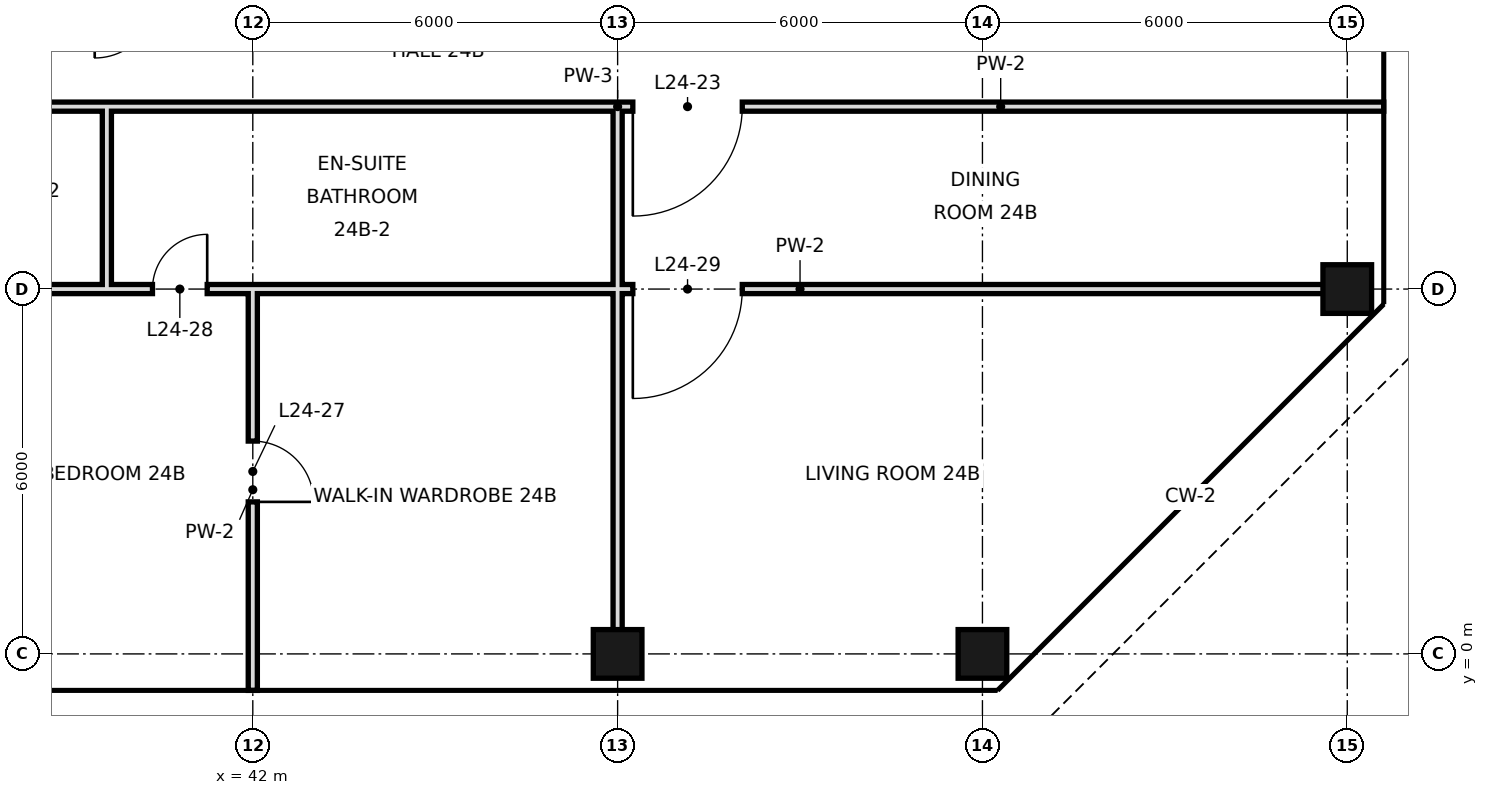
"""IFC4 building model, lengths in metres.
Left out: names, types, materials, properties, quantities, classifications, styles, units other than length and angle.
Written with IfcOpenShell. Run it as: python <this file> out.ifc"""

import sys

from ifc_helpers import new_model, si_unit, direction, frame, frame_2d, origin, origin_2d, place, context, subcontext, project, spatial, rectangle, hollow_rectangle, extrude, element, fill, save


model = new_model("IFC4")
c1 = context("Model", 3, precision=1e-05, world=origin(), true_north=direction((0.0, 1.0)))
c2 = subcontext(c1, "Body", "Model", "MODEL_VIEW")
j1 = project(units=[si_unit("LENGTHUNIT", "METRE"), si_unit("PLANEANGLEUNIT", "RADIAN")], contexts=[c1])
p1 = place(None, origin())
s1 = spatial("IfcSite", under=j1, at=p1, CompositionType="ELEMENT")
p2 = place(p1, origin())
s2 = spatial("IfcBuilding", under=s1, at=p2, CompositionType="ELEMENT")
p3 = place(p2, frame((0.0, 0.0, 110.6)))
s3 = spatial("IfcBuildingStorey", under=s2, at=p3, CompositionType="ELEMENT", Elevation=110.6)
for number, where, z_axis, x_axis in (
    (1, (48.0, 0.0, 0.0), (0.0, 0.0, 1.0), (1.0, 0.0, 0.0)),
    (2, (54.0, 0.0, 0.0), (0.0, 0.0, 1.0), (1.0, 0.0, 0.0)),
    (3, (60.0, 6.0, 0.0), (0.0, 0.0, 1.0), (1.0, 0.0, 0.0)),
):
    element("IfcColumn", number, at=place(p3, frame(where, z_axis=z_axis, x_axis=x_axis)), inside=s3, PredefinedType="COLUMN", context=c2, shape_type="SweptSolid", body=[
        extrude(hollow_rectangle(XDim=0.8, YDim=0.8, WallThickness=0.04, at=origin_2d()), origin(), (0.0, 0.0, 1.0), 3.6),
    ])
p4 = place(p3, frame((39.6, 6.0, 0.0), z_axis=(0.0, 0.0, 1.0), x_axis=(0.0, 1.0, 0.0)))
e4 = element("IfcWall", 4, at=p4, inside=s3, PredefinedType="PARTITIONING", context=c2, shape_type="SweptSolid", body=[
    extrude(rectangle(XDim=3.0, YDim=0.15, at=frame_2d((1.5, 0.0))), origin(), (0.0, 0.0, 1.0), 3.38),
])
p5 = place(p3, frame((42.0, -0.6, 0.0), z_axis=(0.0, 0.0, 1.0), x_axis=(0.0, 1.0, 0.0)))
e5 = element("IfcWall", 5, at=p5, inside=s3, PredefinedType="PARTITIONING", context=c2, shape_type="SweptSolid", body=[
    extrude(rectangle(XDim=6.6, YDim=0.15, at=frame_2d((3.3, 0.0))), origin(), (0.0, 0.0, 1.0), 2.68),
])
p6 = place(p5, frame((3.1, 0.0, 0.0)))
e6 = element("IfcOpeningElement", 6, at=p6, cuts=e5, PredefinedType="OPENING", context=c2, shape_type="SweptSolid", body=[
    extrude(rectangle(XDim=1.0, YDim=2.4, at=frame_2d((0.5, 1.2))), frame((0.0, 0.085, 0.0), z_axis=(0.0, -1.0, 0.0), x_axis=(1.0, 0.0, 0.0)), (0.0, 0.0, 1.0), 0.17),
])
p7 = place(p3, frame((48.0, 0.0, 0.0), z_axis=(0.0, 0.0, 1.0), x_axis=(0.0, 1.0, 0.0)))
e7 = element("IfcWall", 7, at=p7, inside=s3, PredefinedType="PARTITIONING", context=c2, shape_type="SweptSolid", body=[
    extrude(rectangle(XDim=6.0, YDim=0.15, at=frame_2d((3.0, 0.0))), origin(), (0.0, 0.0, 1.0), 2.68),
])
p8 = place(p3, frame((48.0, 6.0, 0.0), z_axis=(0.0, 0.0, 1.0), x_axis=(0.0, 1.0, 0.0)))
e8 = element("IfcWall", 8, at=p8, inside=s3, PredefinedType="PARTITIONING", context=c2, shape_type="SweptSolid", body=[
    extrude(rectangle(XDim=3.0, YDim=0.15, at=frame_2d((1.5, 0.0))), origin(), (0.0, 0.0, 1.0), 2.68),
])
p9 = place(p3, frame((33.0, 6.0, 0.0), z_axis=(0.0, 0.0, 1.0), x_axis=(1.0, 0.0, 0.0)))
e9 = element("IfcWall", 9, at=p9, inside=s3, PredefinedType="PARTITIONING", context=c2, shape_type="SweptSolid", body=[
    extrude(rectangle(XDim=6.6, YDim=0.15, at=frame_2d((3.3, 0.0))), origin(), (0.0, 0.0, 1.0), 2.93),
])
p10 = place(p9, frame((1.3, 0.0, 0.0)))
e10 = element("IfcOpeningElement", 10, at=p10, cuts=e9, PredefinedType="OPENING", context=c2, shape_type="SweptSolid", body=[
    extrude(rectangle(XDim=1.0, YDim=2.4, at=frame_2d((0.5, 1.2))), frame((0.0, 0.085, 0.0), z_axis=(0.0, -1.0, 0.0), x_axis=(1.0, 0.0, 0.0)), (0.0, 0.0, 1.0), 0.17),
])
p11 = place(p9, frame((4.3, 0.0, 0.0)))
e11 = element("IfcOpeningElement", 11, at=p11, cuts=e9, PredefinedType="OPENING", context=c2, shape_type="SweptSolid", body=[
    extrude(rectangle(XDim=1.0, YDim=2.4, at=frame_2d((0.5, 1.2))), frame((0.0, 0.085, 0.0), z_axis=(0.0, -1.0, 0.0), x_axis=(1.0, 0.0, 0.0)), (0.0, 0.0, 1.0), 0.17),
])
p12 = place(p3, frame((48.0, 6.0, 0.0), z_axis=(0.0, 0.0, 1.0), x_axis=(1.0, 0.0, 0.0)))
e12 = element("IfcWall", 12, at=p12, inside=s3, PredefinedType="PARTITIONING", context=c2, shape_type="SweptSolid", body=[
    extrude(rectangle(XDim=12.0, YDim=0.15, at=frame_2d((6.0, 0.0))), origin(), (0.0, 0.0, 1.0), 2.68),
])
p13 = place(p12, frame((0.25, 0.0, 0.0)))
e13 = element("IfcOpeningElement", 13, at=p13, cuts=e12, PredefinedType="OPENING", context=c2, shape_type="SweptSolid", body=[
    extrude(rectangle(XDim=1.8, YDim=2.4, at=frame_2d((0.9, 1.2))), frame((0.0, 0.085, 0.0), z_axis=(0.0, -1.0, 0.0), x_axis=(1.0, 0.0, 0.0)), (0.0, 0.0, 1.0), 0.17),
])
p14 = place(p3, frame((39.6, 6.0, 0.0), z_axis=(0.0, 0.0, 1.0), x_axis=(1.0, 0.0, 0.0)))
e14 = element("IfcWall", 14, at=p14, inside=s3, PredefinedType="PARTITIONING", context=c2, shape_type="SweptSolid", body=[
    extrude(rectangle(XDim=8.4, YDim=0.15, at=frame_2d((4.2, 0.0))), origin(), (0.0, 0.0, 1.0), 2.93),
])
p15 = place(p14, frame((0.75, 0.0, 0.0)))
e15 = element("IfcOpeningElement", 15, at=p15, cuts=e14, PredefinedType="OPENING", context=c2, shape_type="SweptSolid", body=[
    extrude(rectangle(XDim=0.9, YDim=2.4, at=frame_2d((0.45, 1.2))), frame((0.0, 0.085, 0.0), z_axis=(0.0, -1.0, 0.0), x_axis=(1.0, 0.0, 0.0)), (0.0, 0.0, 1.0), 0.17),
])
p16 = place(p3, frame((33.0, 9.0, 0.0), z_axis=(0.0, 0.0, 1.0), x_axis=(1.0, 0.0, 0.0)))
e16 = element("IfcWall", 16, at=p16, inside=s3, PredefinedType="PARTITIONING", context=c2, shape_type="SweptSolid", body=[
    extrude(rectangle(XDim=6.6, YDim=0.15, at=frame_2d((3.3, 0.0))), origin(), (0.0, 0.0, 1.0), 3.38),
])
p17 = place(p16, frame((0.7, 0.0, 0.0)))
e17 = element("IfcOpeningElement", 17, at=p17, cuts=e16, PredefinedType="OPENING", context=c2, shape_type="SweptSolid", body=[
    extrude(rectangle(XDim=1.0, YDim=2.4, at=frame_2d((0.5, 1.2))), frame((0.0, 0.085, 0.0), z_axis=(0.0, -1.0, 0.0), x_axis=(1.0, 0.0, 0.0)), (0.0, 0.0, 1.0), 0.17),
])
p18 = place(p16, frame((4.3, 0.0, 0.0)))
e18 = element("IfcOpeningElement", 18, at=p18, cuts=e16, PredefinedType="OPENING", context=c2, shape_type="SweptSolid", body=[
    extrude(rectangle(XDim=1.0, YDim=2.4, at=frame_2d((0.5, 1.2))), frame((0.0, 0.085, 0.0), z_axis=(0.0, -1.0, 0.0), x_axis=(1.0, 0.0, 0.0)), (0.0, 0.0, 1.0), 0.17),
])
p19 = place(p3, frame((48.0, 9.0, 0.0), z_axis=(0.0, 0.0, 1.0), x_axis=(1.0, 0.0, 0.0)))
e19 = element("IfcWall", 19, at=p19, inside=s3, PredefinedType="PARTITIONING", context=c2, shape_type="SweptSolid", body=[
    extrude(rectangle(XDim=12.6, YDim=0.15, at=frame_2d((6.3, 0.0))), origin(), (0.0, 0.0, 1.0), 3.38),
])
p20 = place(p19, frame((0.25, 0.0, 0.0)))
e20 = element("IfcOpeningElement", 20, at=p20, cuts=e19, PredefinedType="OPENING", context=c2, shape_type="SweptSolid", body=[
    extrude(rectangle(XDim=1.8, YDim=2.4, at=frame_2d((0.9, 1.2))), frame((0.0, 0.085, 0.0), z_axis=(0.0, -1.0, 0.0), x_axis=(1.0, 0.0, 0.0)), (0.0, 0.0, 1.0), 0.17),
])
p21 = place(p3, frame((39.6, 9.0, 0.0), z_axis=(0.0, 0.0, 1.0), x_axis=(1.0, 0.0, 0.0)))
e21 = element("IfcWall", 21, at=p21, inside=s3, PredefinedType="PARTITIONING", context=c2, shape_type="SweptSolid", body=[
    extrude(rectangle(XDim=8.4, YDim=0.15, at=frame_2d((4.2, 0.0))), origin(), (0.0, 0.0, 1.0), 3.38),
])
p22 = place(p20, frame((1.8, 0.0, 0.0), z_axis=(0.0, 0.0, 1.0), x_axis=(-1.0, 0.0, 0.0)))
e22 = element("IfcDoor", 22, at=p22, inside=s3, OperationType="SINGLE_SWING_RIGHT", PredefinedType="DOOR", context=c2, shape_type="SweptSolid", body=[
    extrude(rectangle(XDim=1.8, YDim=2.4, at=frame_2d((0.9, 1.2))), frame((0.0, 0.025, 0.0), z_axis=(0.0, -1.0, 0.0), x_axis=(1.0, 0.0, 0.0)), (0.0, 0.0, 1.0), 0.05),
])
fill(e20, e22)
p23 = place(p6, frame((1.0, 0.0, 0.0), z_axis=(0.0, 0.0, 1.0), x_axis=(-1.0, 0.0, 0.0)))
e23 = element("IfcDoor", 23, at=p23, inside=s3, OperationType="SINGLE_SWING_RIGHT", PredefinedType="DOOR", context=c2, shape_type="SweptSolid", body=[
    extrude(rectangle(XDim=1.0, YDim=2.4, at=frame_2d((0.5, 1.2))), frame((0.0, 0.025, 0.0), z_axis=(0.0, -1.0, 0.0), x_axis=(1.0, 0.0, 0.0)), (0.0, 0.0, 1.0), 0.05),
])
fill(e6, e23)
p24 = place(p15, frame((0.9, 0.0, 0.0), z_axis=(0.0, 0.0, 1.0), x_axis=(-1.0, 0.0, 0.0)))
e24 = element("IfcDoor", 24, at=p24, inside=s3, OperationType="SINGLE_SWING_LEFT", PredefinedType="DOOR", context=c2, shape_type="SweptSolid", body=[
    extrude(rectangle(XDim=0.9, YDim=2.4, at=frame_2d((0.45, 1.2))), frame((0.0, 0.025, 0.0), z_axis=(0.0, -1.0, 0.0), x_axis=(1.0, 0.0, 0.0)), (0.0, 0.0, 1.0), 0.05),
])
fill(e15, e24)
p25 = place(p13, frame((1.8, 0.0, 0.0), z_axis=(0.0, 0.0, 1.0), x_axis=(-1.0, 0.0, 0.0)))
e25 = element("IfcDoor", 25, at=p25, inside=s3, OperationType="SINGLE_SWING_RIGHT", PredefinedType="DOOR", context=c2, shape_type="SweptSolid", body=[
    extrude(rectangle(XDim=1.8, YDim=2.4, at=frame_2d((0.9, 1.2))), frame((0.0, 0.025, 0.0), z_axis=(0.0, -1.0, 0.0), x_axis=(1.0, 0.0, 0.0)), (0.0, 0.0, 1.0), 0.05),
])
fill(e13, e25)
save(model, sys.argv[1])
